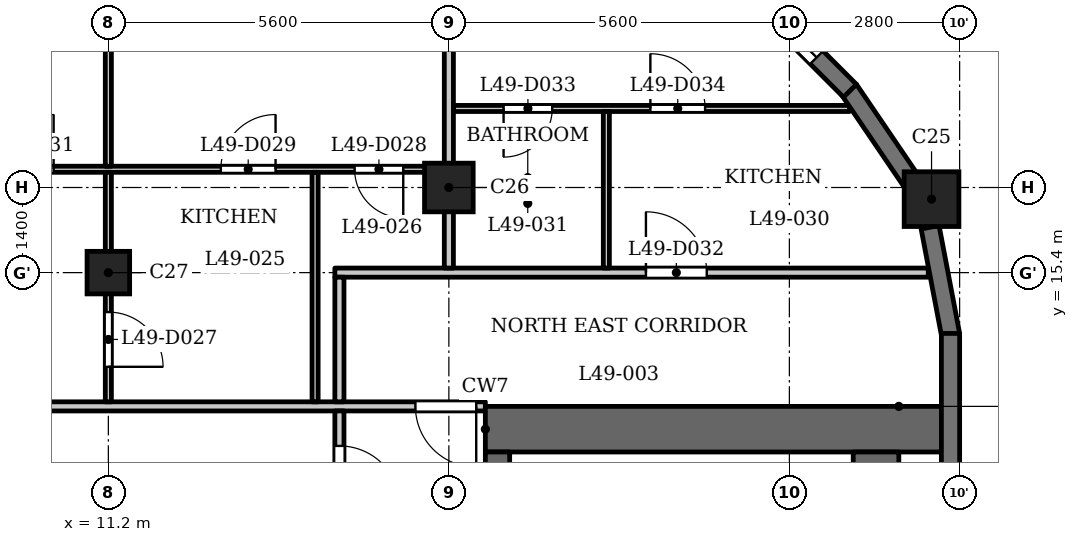
"""IFC4 building model, lengths in metres.
Left out: names, types, materials, properties, quantities, classifications, styles, units other than length and angle.
Written with IfcOpenShell. Run it as: python <this file> out.ifc"""

import sys

from ifc_helpers import new_model, si_unit, direction, frame, frame_2d, origin, origin_2d, place, context, subcontext, project, spatial, rectangle, extrude, element, fill, save


model = new_model("IFC4")
c1 = context("Model", 3, precision=1e-05, world=origin(), true_north=direction((0.0, 1.0)))
c2 = subcontext(c1, "Body", "Model", "MODEL_VIEW")
j1 = project(units=[si_unit("LENGTHUNIT", "METRE"), si_unit("PLANEANGLEUNIT", "RADIAN")], contexts=[c1])
p1 = place(None, origin())
s1 = spatial("IfcSite", under=j1, at=p1, CompositionType="ELEMENT")
p2 = place(p1, origin())
s2 = spatial("IfcBuilding", under=s1, at=p2, CompositionType="ELEMENT")
p3 = place(p2, frame((0.0, 0.0, 192.4)))
s3 = spatial("IfcBuildingStorey", under=s2, at=p3, CompositionType="ELEMENT", Elevation=192.4)
p4 = place(p3, frame((24.738, 16.609, 0.0), z_axis=(0.0, 0.0, 1.0), x_axis=(1.0, 0.0, 0.0)))
e1 = element("IfcColumn", 1, at=p4, inside=s3, PredefinedType="COLUMN", context=c2, shape_type="SweptSolid", body=[
    extrude(rectangle(XDim=0.9, YDim=0.9, at=origin_2d()), origin(), (0.0, 0.0, 1.0), 3.5),
])
p5 = place(p3, frame((16.8, 16.8, 0.0), z_axis=(0.0, 0.0, 1.0), x_axis=(1.0, 0.0, 0.0)))
e2 = element("IfcColumn", 2, at=p5, inside=s3, PredefinedType="COLUMN", context=c2, shape_type="SweptSolid", body=[
    extrude(rectangle(XDim=0.8, YDim=0.8, at=origin_2d()), origin(), (0.0, 0.0, 1.0), 3.5),
])
p6 = place(p3, frame((11.2, 15.4, 0.0), z_axis=(0.0, 0.0, 1.0), x_axis=(1.0, 0.0, 0.0)))
e3 = element("IfcColumn", 3, at=p6, inside=s3, PredefinedType="COLUMN", context=c2, shape_type="SweptSolid", body=[
    extrude(rectangle(XDim=0.7, YDim=0.7, at=origin_2d()), origin(), (0.0, 0.0, 1.0), 3.5),
])
p7 = place(p3, frame((25.05, 11.65, 0.0), z_axis=(0.0, 0.0, 1.0), x_axis=(0.0, 1.0, 0.0)))
e4 = element("IfcWall", 4, at=p7, inside=s3, PredefinedType="SOLIDWALL", context=c2, shape_type="SweptSolid", body=[
    extrude(rectangle(XDim=2.75, YDim=0.3, at=frame_2d((1.375, 0.0))), origin(), (0.0, 0.0, 1.0), 2.5),
])
for number, where, z_axis, x_axis in (
    (5, (25.053, 14.372, 0.0), (0.0, 0.0, 1.0), (-0.187, 0.982, 0.0)),
    (6, (24.394, 16.919, 0.0), (0.0, 0.0, 1.0), (-0.562, 0.827, 0.0)),
):
    element("IfcWall", number, at=place(p3, frame(where, z_axis=z_axis, x_axis=x_axis)), inside=s3, PredefinedType="SOLIDWALL", context=c2, shape_type="SweptSolid", body=[
        extrude(rectangle(XDim=1.806, YDim=0.3, at=frame_2d((0.903, 0.0))), origin(), (0.0, 0.0, 1.0), 2.5),
    ])
p8 = place(p3, frame((23.397, 18.391, 0.0), z_axis=(0.0, 0.0, 1.0), x_axis=(-0.707106781187, 0.707106781187, 0.0)))
e7 = element("IfcWall", 7, at=p8, inside=s3, PredefinedType="SOLIDWALL", context=c2, shape_type="SweptSolid", body=[
    extrude(rectangle(XDim=2.75, YDim=0.3, at=frame_2d((1.375, 0.0))), origin(), (0.0, 0.0, 1.0), 2.5),
])
p9 = place(p8, frame((0.775, 0.0, 0.6)))
e8 = element("IfcOpeningElement", 8, at=p9, cuts=e7, PredefinedType="OPENING", context=c2, shape_type="SweptSolid", body=[
    extrude(rectangle(XDim=1.2, YDim=1.55, at=frame_2d((0.6, 0.775))), frame((0.0, 0.16, 0.0), z_axis=(0.0, -1.0, 0.0), x_axis=(1.0, 0.0, 0.0)), (0.0, 0.0, 1.0), 0.32),
])
p10 = place(p3, frame((17.4, 12.825, 0.0), z_axis=(0.0, 0.0, 1.0), x_axis=(1.0, 0.0, 0.0)))
e9 = element("IfcWall", 9, at=p10, inside=s3, PredefinedType="SHEAR", context=c2, shape_type="SweptSolid", body=[
    extrude(rectangle(XDim=7.6, YDim=0.75, at=frame_2d((3.8, 0.0))), origin(), (0.0, 0.0, 1.0), 3.2),
])
p11 = place(p3, frame((17.6, -12.45, 0.0), z_axis=(0.0, 0.0, 1.0), x_axis=(0.0, 1.0, 0.0)))
e10 = element("IfcWall", 10, at=p11, inside=s3, PredefinedType="SHEAR", context=c2, shape_type="SweptSolid", body=[
    extrude(rectangle(XDim=24.9, YDim=0.4, at=frame_2d((12.45, 0.0))), origin(), (0.0, 0.0, 1.0), 3.2),
])
p12 = place(p11, frame((6.325, 0.0, 0.0)))
e11 = element("IfcOpeningElement", 11, at=p12, cuts=e10, PredefinedType="OPENING", context=c2, shape_type="SweptSolid", body=[
    extrude(rectangle(XDim=0.9, YDim=2.1, at=frame_2d((0.45, 1.05))), frame((0.0, 0.21, 0.0), z_axis=(0.0, -1.0, 0.0), x_axis=(1.0, 0.0, 0.0)), (0.0, 0.0, 1.0), 0.42),
])
p13 = place(p11, frame((9.925, 0.0, 0.0)))
e12 = element("IfcOpeningElement", 12, at=p13, cuts=e10, PredefinedType="OPENING", context=c2, shape_type="SweptSolid", body=[
    extrude(rectangle(XDim=0.9, YDim=2.1, at=frame_2d((0.45, 1.05))), frame((0.0, 0.21, 0.0), z_axis=(0.0, -1.0, 0.0), x_axis=(1.0, 0.0, 0.0)), (0.0, 0.0, 1.0), 0.42),
])
p14 = place(p11, frame((15.6, 0.0, 0.0)))
e13 = element("IfcOpeningElement", 13, at=p14, cuts=e10, PredefinedType="OPENING", context=c2, shape_type="SweptSolid", body=[
    extrude(rectangle(XDim=1.1, YDim=2.1, at=frame_2d((0.55, 1.05))), frame((0.0, 0.21, 0.0), z_axis=(0.0, -1.0, 0.0), x_axis=(1.0, 0.0, 0.0)), (0.0, 0.0, 1.0), 0.42),
])
p15 = place(p11, frame((18.0, 0.0, 0.0)))
e14 = element("IfcOpeningElement", 14, at=p15, cuts=e10, PredefinedType="OPENING", context=c2, shape_type="SweptSolid", body=[
    extrude(rectangle(XDim=1.1, YDim=2.1, at=frame_2d((0.55, 1.05))), frame((0.0, 0.21, 0.0), z_axis=(0.0, -1.0, 0.0), x_axis=(1.0, 0.0, 0.0)), (0.0, 0.0, 1.0), 0.42),
])
p16 = place(p11, frame((23.025, 0.0, 0.0)))
e15 = element("IfcOpeningElement", 15, at=p16, cuts=e10, PredefinedType="OPENING", context=c2, shape_type="SweptSolid", body=[
    extrude(rectangle(XDim=1.1, YDim=2.1, at=frame_2d((0.55, 1.05))), frame((0.0, 0.21, 0.0), z_axis=(0.0, -1.0, 0.0), x_axis=(1.0, 0.0, 0.0)), (0.0, 0.0, 1.0), 0.42),
])
p17 = place(p11, frame((0.775, 0.0, 0.0)))
e16 = element("IfcOpeningElement", 16, at=p17, cuts=e10, PredefinedType="OPENING", context=c2, shape_type="SweptSolid", body=[
    extrude(rectangle(XDim=1.1, YDim=2.1, at=frame_2d((0.55, 1.05))), frame((0.0, 0.21, 0.0), z_axis=(0.0, -1.0, 0.0), x_axis=(1.0, 0.0, 0.0)), (0.0, 0.0, 1.0), 0.42),
])
p18 = place(p11, frame((12.925, 0.0, 0.0)))
e17 = element("IfcOpeningElement", 17, at=p18, cuts=e10, PredefinedType="OPENING", context=c2, shape_type="SweptSolid", body=[
    extrude(rectangle(XDim=1.8, YDim=2.1, at=frame_2d((0.9, 1.05))), frame((0.0, 0.21, 0.0), z_axis=(0.0, -1.0, 0.0), x_axis=(1.0, 0.0, 0.0)), (0.0, 0.0, 1.0), 0.42),
])
p19 = place(p3, frame((23.825, -12.45, 0.0), z_axis=(0.0, 0.0, 1.0), x_axis=(0.0, 1.0, 0.0)))
e18 = element("IfcWall", 18, at=p19, inside=s3, PredefinedType="SHEAR", context=c2, shape_type="SweptSolid", body=[
    extrude(rectangle(XDim=24.9, YDim=0.75, at=frame_2d((12.45, 0.0))), origin(), (0.0, 0.0, 1.0), 3.2),
])
p20 = place(p3, frame((-17.4, 13.2, 0.0), z_axis=(0.0, 0.0, 1.0), x_axis=(1.0, 0.0, 0.0)))
e19 = element("IfcWall", 19, at=p20, inside=s3, PredefinedType="PARTITIONING", context=c2, shape_type="SweptSolid", body=[
    extrude(rectangle(XDim=34.8, YDim=0.15, at=frame_2d((17.4, 0.0))), origin(), (0.0, 0.0, 1.0), 3.2),
])
p21 = place(p20, frame((0.25, 0.0, 0.0)))
e20 = element("IfcOpeningElement", 20, at=p21, cuts=e19, PredefinedType="OPENING", context=c2, shape_type="SweptSolid", body=[
    extrude(rectangle(XDim=1.0, YDim=2.1, at=frame_2d((0.5, 1.05))), frame((0.0, 0.085, 0.0), z_axis=(0.0, -1.0, 0.0), x_axis=(1.0, 0.0, 0.0)), (0.0, 0.0, 1.0), 0.17),
])
p22 = place(p20, frame((33.65, 0.0, 0.0)))
e21 = element("IfcOpeningElement", 21, at=p22, cuts=e19, PredefinedType="OPENING", context=c2, shape_type="SweptSolid", body=[
    extrude(rectangle(XDim=1.0, YDim=2.1, at=frame_2d((0.5, 1.05))), frame((0.0, 0.085, 0.0), z_axis=(0.0, -1.0, 0.0), x_axis=(1.0, 0.0, 0.0)), (0.0, 0.0, 1.0), 0.17),
])
p23 = place(p20, frame((10.15, 0.0, 0.0)))
e22 = element("IfcOpeningElement", 22, at=p23, cuts=e19, PredefinedType="OPENING", context=c2, shape_type="SweptSolid", body=[
    extrude(rectangle(XDim=1.0, YDim=2.1, at=frame_2d((0.5, 1.05))), frame((0.0, 0.085, 0.0), z_axis=(0.0, -1.0, 0.0), x_axis=(1.0, 0.0, 0.0)), (0.0, 0.0, 1.0), 0.17),
])
p24 = place(p20, frame((13.55, 0.0, 0.0)))
e23 = element("IfcOpeningElement", 23, at=p24, cuts=e19, PredefinedType="OPENING", context=c2, shape_type="SweptSolid", body=[
    extrude(rectangle(XDim=1.0, YDim=2.1, at=frame_2d((0.5, 1.05))), frame((0.0, 0.085, 0.0), z_axis=(0.0, -1.0, 0.0), x_axis=(1.0, 0.0, 0.0)), (0.0, 0.0, 1.0), 0.17),
])
p25 = place(p20, frame((20.85, 0.0, 0.0)))
e24 = element("IfcOpeningElement", 24, at=p25, cuts=e19, PredefinedType="OPENING", context=c2, shape_type="SweptSolid", body=[
    extrude(rectangle(XDim=1.0, YDim=2.1, at=frame_2d((0.5, 1.05))), frame((0.0, 0.085, 0.0), z_axis=(0.0, -1.0, 0.0), x_axis=(1.0, 0.0, 0.0)), (0.0, 0.0, 1.0), 0.17),
])
p26 = place(p20, frame((23.7, 0.0, 0.0)))
e25 = element("IfcOpeningElement", 25, at=p26, cuts=e19, PredefinedType="OPENING", context=c2, shape_type="SweptSolid", body=[
    extrude(rectangle(XDim=1.0, YDim=2.1, at=frame_2d((0.5, 1.05))), frame((0.0, 0.085, 0.0), z_axis=(0.0, -1.0, 0.0), x_axis=(1.0, 0.0, 0.0)), (0.0, 0.0, 1.0), 0.17),
])
p27 = place(p3, frame((14.925, 15.4, 0.0), z_axis=(0.0, 0.0, 1.0), x_axis=(1.0, 0.0, 0.0)))
e26 = element("IfcWall", 26, at=p27, inside=s3, PredefinedType="PARTITIONING", context=c2, shape_type="SweptSolid", body=[
    extrude(rectangle(XDim=9.759, YDim=0.15, at=frame_2d((4.879, 0.0))), origin(), (0.0, 0.0, 1.0), 3.2),
])
p28 = place(p27, frame((5.116, 0.0, 0.0)))
e27 = element("IfcOpeningElement", 27, at=p28, cuts=e26, PredefinedType="OPENING", context=c2, shape_type="SweptSolid", body=[
    extrude(rectangle(XDim=1.0, YDim=2.1, at=frame_2d((0.5, 1.05))), frame((0.0, 0.085, 0.0), z_axis=(0.0, -1.0, 0.0), x_axis=(1.0, 0.0, 0.0)), (0.0, 0.0, 1.0), 0.17),
])
p29 = place(p3, frame((-16.725, 17.1, 0.0), z_axis=(0.0, 0.0, 1.0), x_axis=(1.0, 0.0, 0.0)))
e28 = element("IfcWall", 28, at=p29, inside=s3, PredefinedType="PARTITIONING", context=c2, shape_type="SweptSolid", body=[
    extrude(rectangle(XDim=33.45, YDim=0.1, at=frame_2d((16.725, 0.0))), origin(), (0.0, 0.0, 1.0), 3.2),
])
p30 = place(p29, frame((4.075, 0.0, 0.0)))
e29 = element("IfcOpeningElement", 29, at=p30, cuts=e28, PredefinedType="OPENING", context=c2, shape_type="SweptSolid", body=[
    extrude(rectangle(XDim=0.8, YDim=2.1, at=frame_2d((0.4, 1.05))), frame((0.0, 0.06, 0.0), z_axis=(0.0, -1.0, 0.0), x_axis=(1.0, 0.0, 0.0)), (0.0, 0.0, 1.0), 0.12),
])
p31 = place(p29, frame((9.575, 0.0, 0.0)))
e30 = element("IfcOpeningElement", 30, at=p31, cuts=e28, PredefinedType="OPENING", context=c2, shape_type="SweptSolid", body=[
    extrude(rectangle(XDim=0.9, YDim=2.1, at=frame_2d((0.45, 1.05))), frame((0.0, 0.06, 0.0), z_axis=(0.0, -1.0, 0.0), x_axis=(1.0, 0.0, 0.0)), (0.0, 0.0, 1.0), 0.12),
])
p32 = place(p29, frame((15.175, 0.0, 0.0)))
e31 = element("IfcOpeningElement", 31, at=p32, cuts=e28, PredefinedType="OPENING", context=c2, shape_type="SweptSolid", body=[
    extrude(rectangle(XDim=0.8, YDim=2.1, at=frame_2d((0.4, 1.05))), frame((0.0, 0.06, 0.0), z_axis=(0.0, -1.0, 0.0), x_axis=(1.0, 0.0, 0.0)), (0.0, 0.0, 1.0), 0.12),
])
p33 = place(p29, frame((12.975, 0.0, 0.0)))
e32 = element("IfcOpeningElement", 32, at=p33, cuts=e28, PredefinedType="OPENING", context=c2, shape_type="SweptSolid", body=[
    extrude(rectangle(XDim=0.9, YDim=2.1, at=frame_2d((0.45, 1.05))), frame((0.0, 0.06, 0.0), z_axis=(0.0, -1.0, 0.0), x_axis=(1.0, 0.0, 0.0)), (0.0, 0.0, 1.0), 0.12),
])
p34 = place(p29, frame((17.625, 0.0, 0.0)))
e33 = element("IfcOpeningElement", 33, at=p34, cuts=e28, PredefinedType="OPENING", context=c2, shape_type="SweptSolid", body=[
    extrude(rectangle(XDim=0.8, YDim=2.1, at=frame_2d((0.4, 1.05))), frame((0.0, 0.06, 0.0), z_axis=(0.0, -1.0, 0.0), x_axis=(1.0, 0.0, 0.0)), (0.0, 0.0, 1.0), 0.12),
])
p35 = place(p29, frame((20.025, 0.0, 0.0)))
e34 = element("IfcOpeningElement", 34, at=p35, cuts=e28, PredefinedType="OPENING", context=c2, shape_type="SweptSolid", body=[
    extrude(rectangle(XDim=0.9, YDim=2.1, at=frame_2d((0.45, 1.05))), frame((0.0, 0.06, 0.0), z_axis=(0.0, -1.0, 0.0), x_axis=(1.0, 0.0, 0.0)), (0.0, 0.0, 1.0), 0.12),
])
p36 = place(p29, frame((31.975, 0.0, 0.0)))
e35 = element("IfcOpeningElement", 35, at=p36, cuts=e28, PredefinedType="OPENING", context=c2, shape_type="SweptSolid", body=[
    extrude(rectangle(XDim=0.8, YDim=2.1, at=frame_2d((0.4, 1.05))), frame((0.0, 0.06, 0.0), z_axis=(0.0, -1.0, 0.0), x_axis=(1.0, 0.0, 0.0)), (0.0, 0.0, 1.0), 0.12),
])
p37 = place(p29, frame((29.775, 0.0, 0.0)))
e36 = element("IfcOpeningElement", 36, at=p37, cuts=e28, PredefinedType="OPENING", context=c2, shape_type="SweptSolid", body=[
    extrude(rectangle(XDim=0.9, YDim=2.1, at=frame_2d((0.45, 1.05))), frame((0.0, 0.06, 0.0), z_axis=(0.0, -1.0, 0.0), x_axis=(1.0, 0.0, 0.0)), (0.0, 0.0, 1.0), 0.12),
])
p38 = place(p29, frame((23.025, 0.0, 0.0)))
e37 = element("IfcOpeningElement", 37, at=p38, cuts=e28, PredefinedType="OPENING", context=c2, shape_type="SweptSolid", body=[
    extrude(rectangle(XDim=0.9, YDim=2.1, at=frame_2d((0.45, 1.05))), frame((0.0, 0.06, 0.0), z_axis=(0.0, -1.0, 0.0), x_axis=(1.0, 0.0, 0.0)), (0.0, 0.0, 1.0), 0.12),
])
p39 = place(p29, frame((26.125, 0.0, 0.0)))
e38 = element("IfcOpeningElement", 38, at=p39, cuts=e28, PredefinedType="OPENING", context=c2, shape_type="SweptSolid", body=[
    extrude(rectangle(XDim=0.9, YDim=2.1, at=frame_2d((0.45, 1.05))), frame((0.0, 0.06, 0.0), z_axis=(0.0, -1.0, 0.0), x_axis=(1.0, 0.0, 0.0)), (0.0, 0.0, 1.0), 0.12),
])
p40 = place(p3, frame((16.875, 18.1, 0.0), z_axis=(0.0, 0.0, 1.0), x_axis=(1.0, 0.0, 0.0)))
e39 = element("IfcWall", 39, at=p40, inside=s3, PredefinedType="PARTITIONING", context=c2, shape_type="SweptSolid", body=[
    extrude(rectangle(XDim=6.515, YDim=0.1, at=frame_2d((3.258, 0.0))), origin(), (0.0, 0.0, 1.0), 3.2),
])
p41 = place(p40, frame((0.825, 0.0, 0.0)))
e40 = element("IfcOpeningElement", 40, at=p41, cuts=e39, PredefinedType="OPENING", context=c2, shape_type="SweptSolid", body=[
    extrude(rectangle(XDim=0.8, YDim=2.1, at=frame_2d((0.4, 1.05))), frame((0.0, 0.06, 0.0), z_axis=(0.0, -1.0, 0.0), x_axis=(1.0, 0.0, 0.0)), (0.0, 0.0, 1.0), 0.12),
])
p42 = place(p40, frame((3.239, 0.0, 0.0)))
e41 = element("IfcOpeningElement", 41, at=p42, cuts=e39, PredefinedType="OPENING", context=c2, shape_type="SweptSolid", body=[
    extrude(rectangle(XDim=0.9, YDim=2.1, at=frame_2d((0.45, 1.05))), frame((0.0, 0.06, 0.0), z_axis=(0.0, -1.0, 0.0), x_axis=(1.0, 0.0, 0.0)), (0.0, 0.0, 1.0), 0.12),
])
p43 = place(p3, frame((11.2, 13.275, 0.0), z_axis=(0.0, 0.0, 1.0), x_axis=(0.0, 1.0, 0.0)))
e42 = element("IfcWall", 42, at=p43, inside=s3, PredefinedType="PARTITIONING", context=c2, shape_type="SweptSolid", body=[
    extrude(rectangle(XDim=3.775, YDim=0.1, at=frame_2d((1.888, 0.0))), origin(), (0.0, 0.0, 1.0), 3.2),
])
p44 = place(p43, frame((0.576, 0.0, 0.0)))
e43 = element("IfcOpeningElement", 43, at=p44, cuts=e42, PredefinedType="OPENING", context=c2, shape_type="SweptSolid", body=[
    extrude(rectangle(XDim=0.9, YDim=2.1, at=frame_2d((0.45, 1.05))), frame((0.0, 0.06, 0.0), z_axis=(0.0, -1.0, 0.0), x_axis=(1.0, 0.0, 0.0)), (0.0, 0.0, 1.0), 0.12),
])
p45 = place(p3, frame((11.2, 17.15, 0.0), z_axis=(0.0, 0.0, 1.0), x_axis=(0.0, 1.0, 0.0)))
e44 = element("IfcWall", 44, at=p45, inside=s3, PredefinedType="PARTITIONING", context=c2, shape_type="SweptSolid", body=[
    extrude(rectangle(XDim=4.93, YDim=0.1, at=frame_2d((2.465, 0.0))), origin(), (0.0, 0.0, 1.0), 3.2),
])
p46 = place(p3, frame((14.6, 13.275, 0.0), z_axis=(0.0, 0.0, 1.0), x_axis=(0.0, 1.0, 0.0)))
e45 = element("IfcWall", 45, at=p46, inside=s3, PredefinedType="PARTITIONING", context=c2, shape_type="SweptSolid", body=[
    extrude(rectangle(XDim=3.775, YDim=0.1, at=frame_2d((1.888, 0.0))), origin(), (0.0, 0.0, 1.0), 3.2),
])
p47 = place(p3, frame((15.0, 6.769, 0.0), z_axis=(0.0, 0.0, 1.0), x_axis=(0.0, 1.0, 0.0)))
e46 = element("IfcWall", 46, at=p47, inside=s3, PredefinedType="PARTITIONING", context=c2, shape_type="SweptSolid", body=[
    extrude(rectangle(XDim=6.356, YDim=0.15, at=frame_2d((3.178, 0.0))), origin(), (0.0, 0.0, 1.0), 3.2),
])
p48 = place(p47, frame((4.781, 0.0, 0.0)))
e47 = element("IfcOpeningElement", 47, at=p48, cuts=e46, PredefinedType="OPENING", context=c2, shape_type="SweptSolid", body=[
    extrude(rectangle(XDim=1.0, YDim=2.1, at=frame_2d((0.5, 1.05))), frame((0.0, 0.085, 0.0), z_axis=(0.0, -1.0, 0.0), x_axis=(1.0, 0.0, 0.0)), (0.0, 0.0, 1.0), 0.17),
])
p49 = place(p3, frame((15.0, 13.275, 0.0), z_axis=(0.0, 0.0, 1.0), x_axis=(0.0, 1.0, 0.0)))
e48 = element("IfcWall", 48, at=p49, inside=s3, PredefinedType="PARTITIONING", context=c2, shape_type="SweptSolid", body=[
    extrude(rectangle(XDim=2.05, YDim=0.15, at=frame_2d((1.025, 0.0))), origin(), (0.0, 0.0, 1.0), 3.2),
])
p50 = place(p3, frame((16.8, 15.475, 0.0), z_axis=(0.0, 0.0, 1.0), x_axis=(0.0, 1.0, 0.0)))
e49 = element("IfcWall", 49, at=p50, inside=s3, PredefinedType="PARTITIONING", context=c2, shape_type="SweptSolid", body=[
    extrude(rectangle(XDim=6.835, YDim=0.15, at=frame_2d((3.417, 0.0))), origin(), (0.0, 0.0, 1.0), 2.55),
])
p51 = place(p3, frame((19.39, 15.475, 0.0), z_axis=(0.0, 0.0, 1.0), x_axis=(0.0, 1.0, 0.0)))
e50 = element("IfcWall", 50, at=p51, inside=s3, PredefinedType="PARTITIONING", context=c2, shape_type="SweptSolid", body=[
    extrude(rectangle(XDim=2.575, YDim=0.1, at=frame_2d((1.288, 0.0))), origin(), (0.0, 0.0, 1.0), 3.2),
])
p52 = place(p48, origin())
e51 = element("IfcDoor", 51, at=p52, inside=s3, OperationType="SINGLE_SWING_LEFT", PredefinedType="DOOR", context=c2, shape_type="SweptSolid", body=[
    extrude(rectangle(XDim=1.0, YDim=2.1, at=frame_2d((0.5, 1.05))), frame((0.0, 0.025, 0.0), z_axis=(0.0, -1.0, 0.0), x_axis=(1.0, 0.0, 0.0)), (0.0, 0.0, 1.0), 0.05),
])
fill(e47, e51)
p53 = place(p22, origin())
e52 = element("IfcDoor", 52, at=p53, inside=s3, OperationType="SINGLE_SWING_RIGHT", PredefinedType="DOOR", context=c2, shape_type="SweptSolid", body=[
    extrude(rectangle(XDim=1.0, YDim=2.1, at=frame_2d((0.5, 1.05))), frame((0.0, 0.025, 0.0), z_axis=(0.0, -1.0, 0.0), x_axis=(1.0, 0.0, 0.0)), (0.0, 0.0, 1.0), 0.05),
])
fill(e21, e52)
p54 = place(p44, origin())
e53 = element("IfcDoor", 53, at=p54, inside=s3, OperationType="SINGLE_SWING_LEFT", PredefinedType="DOOR", context=c2, shape_type="SweptSolid", body=[
    extrude(rectangle(XDim=0.9, YDim=2.1, at=frame_2d((0.45, 1.05))), frame((0.0, 0.025, 0.0), z_axis=(0.0, -1.0, 0.0), x_axis=(1.0, 0.0, 0.0)), (0.0, 0.0, 1.0), 0.05),
])
fill(e43, e53)
p55 = place(p36, origin())
e54 = element("IfcDoor", 54, at=p55, inside=s3, OperationType="SINGLE_SWING_RIGHT", PredefinedType="DOOR", context=c2, shape_type="SweptSolid", body=[
    extrude(rectangle(XDim=0.8, YDim=2.1, at=frame_2d((0.4, 1.05))), frame((0.0, 0.025, 0.0), z_axis=(0.0, -1.0, 0.0), x_axis=(1.0, 0.0, 0.0)), (0.0, 0.0, 1.0), 0.05),
])
fill(e35, e54)
p56 = place(p37, origin())
e55 = element("IfcDoor", 55, at=p56, inside=s3, OperationType="SINGLE_SWING_LEFT", PredefinedType="DOOR", context=c2, shape_type="SweptSolid", body=[
    extrude(rectangle(XDim=0.9, YDim=2.1, at=frame_2d((0.45, 1.05))), frame((0.0, 0.025, 0.0), z_axis=(0.0, -1.0, 0.0), x_axis=(1.0, 0.0, 0.0)), (0.0, 0.0, 1.0), 0.05),
])
fill(e36, e55)
p57 = place(p39, origin())
e56 = element("IfcDoor", 56, at=p57, inside=s3, OperationType="SINGLE_SWING_LEFT", PredefinedType="DOOR", context=c2, shape_type="SweptSolid", body=[
    extrude(rectangle(XDim=0.9, YDim=2.1, at=frame_2d((0.45, 1.05))), frame((0.0, 0.025, 0.0), z_axis=(0.0, -1.0, 0.0), x_axis=(1.0, 0.0, 0.0)), (0.0, 0.0, 1.0), 0.05),
])
fill(e38, e56)
p58 = place(p28, origin())
e57 = element("IfcDoor", 57, at=p58, inside=s3, OperationType="SINGLE_SWING_RIGHT", PredefinedType="DOOR", context=c2, shape_type="SweptSolid", body=[
    extrude(rectangle(XDim=1.0, YDim=2.1, at=frame_2d((0.5, 1.05))), frame((0.0, 0.025, 0.0), z_axis=(0.0, -1.0, 0.0), x_axis=(1.0, 0.0, 0.0)), (0.0, 0.0, 1.0), 0.05),
])
fill(e27, e57)
p59 = place(p41, origin())
e58 = element("IfcDoor", 58, at=p59, inside=s3, OperationType="SINGLE_SWING_LEFT", PredefinedType="DOOR", context=c2, shape_type="SweptSolid", body=[
    extrude(rectangle(XDim=0.8, YDim=2.1, at=frame_2d((0.4, 1.05))), frame((0.0, 0.025, 0.0), z_axis=(0.0, -1.0, 0.0), x_axis=(1.0, 0.0, 0.0)), (0.0, 0.0, 1.0), 0.05),
])
fill(e40, e58)
p60 = place(p42, origin())
e59 = element("IfcDoor", 59, at=p60, inside=s3, OperationType="SINGLE_SWING_RIGHT", PredefinedType="DOOR", context=c2, shape_type="SweptSolid", body=[
    extrude(rectangle(XDim=0.9, YDim=2.1, at=frame_2d((0.45, 1.05))), frame((0.0, 0.025, 0.0), z_axis=(0.0, -1.0, 0.0), x_axis=(1.0, 0.0, 0.0)), (0.0, 0.0, 1.0), 0.05),
])
fill(e41, e59)
p61 = place(p9, origin())
e60 = element("IfcWindow", 60, at=p61, inside=s3, PartitioningType="SINGLE_PANEL", PredefinedType="WINDOW", context=c2, shape_type="SweptSolid", body=[
    extrude(rectangle(XDim=1.2, YDim=1.55, at=frame_2d((0.6, 0.775))), frame((0.0, 0.03, 0.0), z_axis=(0.0, -1.0, 0.0), x_axis=(1.0, 0.0, 0.0)), (0.0, 0.0, 1.0), 0.06),
])
fill(e8, e60)
save(model, sys.argv[1])
